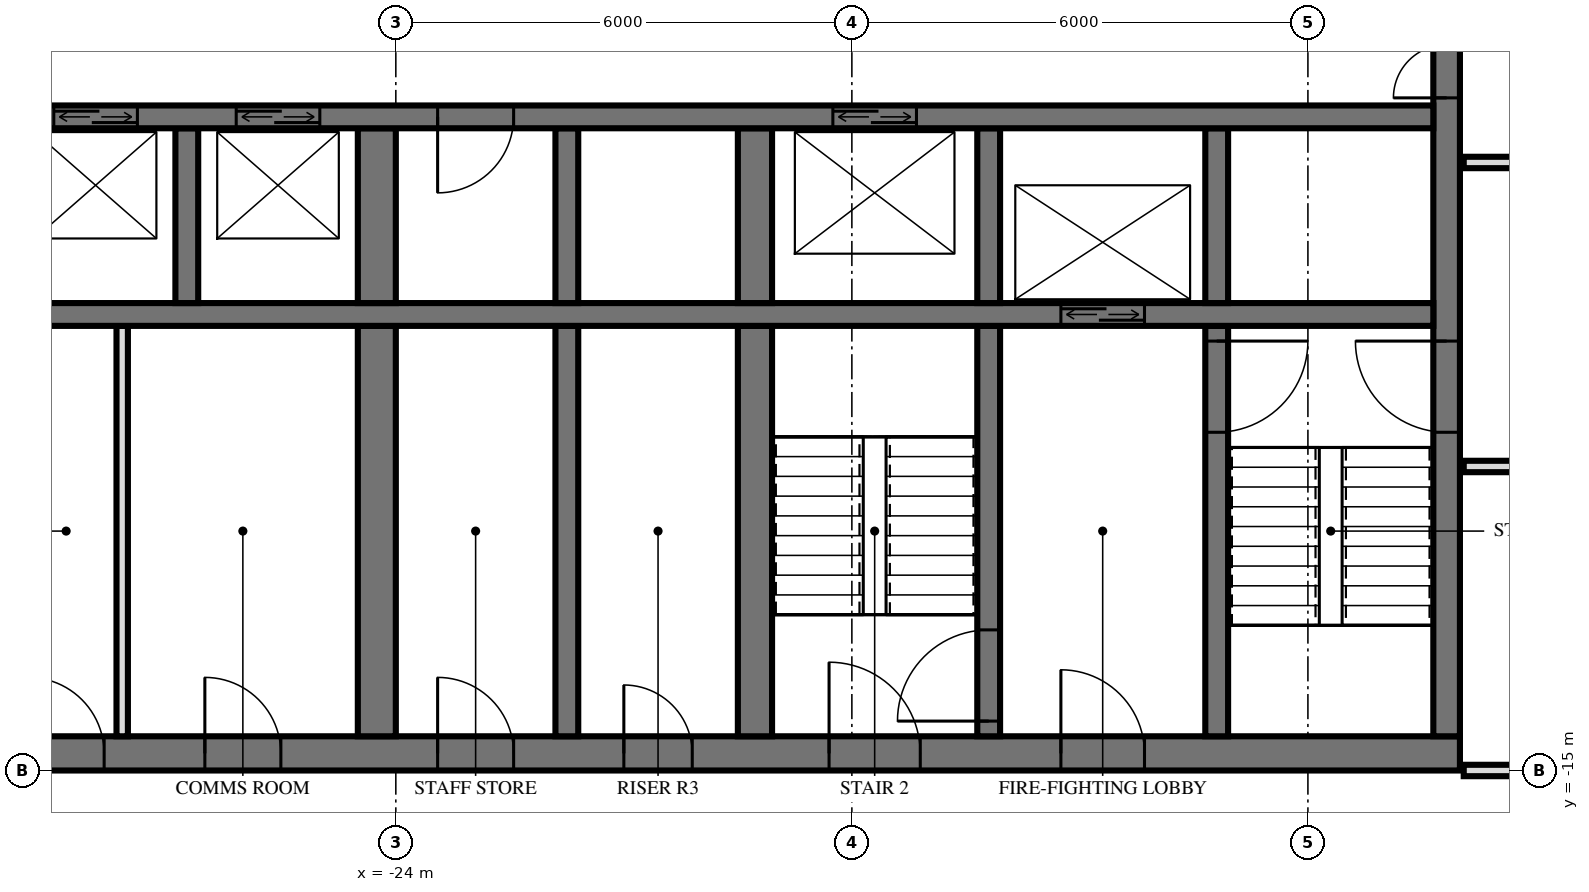
"""IFC4 building model, lengths in metres.
Left out: names, types, materials, properties, quantities, classifications, styles, units other than length and angle.
Written with IfcOpenShell. Run it as: python <this file> out.ifc"""

import sys

from ifc_helpers import new_model, si_unit, direction, frame, frame_2d, origin, place, context, subcontext, project, spatial, rectangle, extrude, element, fill, save


model = new_model("IFC4")
c1 = context("Model", 3, precision=1e-05, world=origin(), true_north=direction((0.0, 1.0)))
c2 = subcontext(c1, "Body", "Model", "MODEL_VIEW")
j1 = project(units=[si_unit("LENGTHUNIT", "METRE"), si_unit("PLANEANGLEUNIT", "RADIAN")], contexts=[c1])
p1 = place(None, origin())
s1 = spatial("IfcSite", under=j1, at=p1, CompositionType="ELEMENT")
p2 = place(p1, origin())
s2 = spatial("IfcBuilding", under=s1, at=p2, CompositionType="ELEMENT")
p3 = place(p2, frame((0.0, 0.0, 38.4)))
s3 = spatial("IfcBuildingStorey", under=s2, at=p3, CompositionType="ELEMENT", Elevation=38.4)
p4 = place(p3, frame((-29.5, -14.775, 0.0), z_axis=(0.0, 0.0, 1.0), x_axis=(1.0, 0.0, 0.0)))
e1 = element("IfcWall", 1, at=p4, inside=s3, PredefinedType="SHEAR", context=c2, shape_type="SweptSolid", body=[
    extrude(rectangle(XDim=19.5, YDim=0.45, at=frame_2d((9.75, 0.0))), origin(), (0.0, 0.0, 1.0), 3.6),
])
p5 = place(p4, frame((11.2, 0.0, 0.0)))
e2 = element("IfcOpeningElement", 2, at=p5, cuts=e1, PredefinedType="OPENING", context=c2, shape_type="SweptSolid", body=[
    extrude(rectangle(XDim=1.2, YDim=2.1, at=frame_2d((0.6, 1.05))), frame((0.0, 0.235, 0.0), z_axis=(0.0, -1.0, 0.0), x_axis=(1.0, 0.0, 0.0)), (0.0, 0.0, 1.0), 0.47),
])
p6 = place(p4, frame((14.25, 0.0, 0.0)))
e3 = element("IfcOpeningElement", 3, at=p6, cuts=e1, PredefinedType="OPENING", context=c2, shape_type="SweptSolid", body=[
    extrude(rectangle(XDim=1.1, YDim=2.1, at=frame_2d((0.55, 1.05))), frame((0.0, 0.235, 0.0), z_axis=(0.0, -1.0, 0.0), x_axis=(1.0, 0.0, 0.0)), (0.0, 0.0, 1.0), 0.47),
])
p7 = place(p4, frame((8.5, 0.0, 0.0)))
e4 = element("IfcOpeningElement", 4, at=p7, cuts=e1, PredefinedType="OPENING", context=c2, shape_type="SweptSolid", body=[
    extrude(rectangle(XDim=0.9, YDim=2.1, at=frame_2d((0.45, 1.05))), frame((0.0, 0.235, 0.0), z_axis=(0.0, -1.0, 0.0), x_axis=(1.0, 0.0, 0.0)), (0.0, 0.0, 1.0), 0.47),
])
p8 = place(p4, frame((6.05, 0.0, 0.0)))
e5 = element("IfcOpeningElement", 5, at=p8, cuts=e1, PredefinedType="OPENING", context=c2, shape_type="SweptSolid", body=[
    extrude(rectangle(XDim=1.0, YDim=2.1, at=frame_2d((0.5, 1.05))), frame((0.0, 0.235, 0.0), z_axis=(0.0, -1.0, 0.0), x_axis=(1.0, 0.0, 0.0)), (0.0, 0.0, 1.0), 0.47),
])
p9 = place(p4, frame((2.988, 0.0, 0.0)))
e6 = element("IfcOpeningElement", 6, at=p9, cuts=e1, PredefinedType="OPENING", context=c2, shape_type="SweptSolid", body=[
    extrude(rectangle(XDim=1.0, YDim=2.1, at=frame_2d((0.5, 1.05))), frame((0.0, 0.235, 0.0), z_axis=(0.0, -1.0, 0.0), x_axis=(1.0, 0.0, 0.0)), (0.0, 0.0, 1.0), 0.47),
])
p10 = place(p4, frame((0.663, 0.0, 0.0)))
e7 = element("IfcOpeningElement", 7, at=p10, cuts=e1, PredefinedType="OPENING", context=c2, shape_type="SweptSolid", body=[
    extrude(rectangle(XDim=1.0, YDim=2.1, at=frame_2d((0.5, 1.05))), frame((0.0, 0.235, 0.0), z_axis=(0.0, -1.0, 0.0), x_axis=(1.0, 0.0, 0.0)), (0.0, 0.0, 1.0), 0.47),
])
p11 = place(p3, frame((-10.175, -14.55, 0.0), z_axis=(0.0, 0.0, 1.0), x_axis=(0.0, 1.0, 0.0)))
e8 = element("IfcWall", 8, at=p11, inside=s3, PredefinedType="SHEAR", context=c2, shape_type="SweptSolid", body=[
    extrude(rectangle(XDim=14.1, YDim=0.35, at=frame_2d((7.05, 0.0))), origin(), (0.0, 0.0, 1.0), 3.6),
])
p12 = place(p11, frame((8.4, 0.0, 0.0)))
e9 = element("IfcOpeningElement", 9, at=p12, cuts=e8, PredefinedType="OPENING", context=c2, shape_type="SweptSolid", body=[
    extrude(rectangle(XDim=1.4, YDim=2.4, at=frame_2d((0.7, 1.2))), frame((0.0, 0.185, 0.0), z_axis=(0.0, -1.0, 0.0), x_axis=(1.0, 0.0, 0.0)), (0.0, 0.0, 1.0), 0.37),
])
p13 = place(p11, frame((10.0, 0.0, 0.0)))
e10 = element("IfcOpeningElement", 10, at=p13, cuts=e8, PredefinedType="OPENING", context=c2, shape_type="SweptSolid", body=[
    extrude(rectangle(XDim=1.4, YDim=2.4, at=frame_2d((0.7, 1.2))), frame((0.0, 0.185, 0.0), z_axis=(0.0, -1.0, 0.0), x_axis=(1.0, 0.0, 0.0)), (0.0, 0.0, 1.0), 0.37),
])
p14 = place(p11, frame((4.0, 0.0, 0.0)))
e11 = element("IfcOpeningElement", 11, at=p14, cuts=e8, PredefinedType="OPENING", context=c2, shape_type="SweptSolid", body=[
    extrude(rectangle(XDim=1.2, YDim=2.1, at=frame_2d((0.6, 1.05))), frame((0.0, 0.185, 0.0), z_axis=(0.0, -1.0, 0.0), x_axis=(1.0, 0.0, 0.0)), (0.0, 0.0, 1.0), 0.37),
])
p15 = place(p3, frame((-29.05, -6.4, 0.0), z_axis=(0.0, 0.0, 1.0), x_axis=(1.0, 0.0, 0.0)))
e12 = element("IfcWall", 12, at=p15, inside=s3, PredefinedType="SHEAR", context=c2, shape_type="SweptSolid", body=[
    extrude(rectangle(XDim=18.7, YDim=0.3, at=frame_2d((9.35, 0.0))), origin(), (0.0, 0.0, 1.0), 3.6),
])
p16 = place(p15, frame((2.95, 0.0, 0.0)))
e13 = element("IfcOpeningElement", 13, at=p16, cuts=e12, PredefinedType="OPENING", context=c2, shape_type="SweptSolid", body=[
    extrude(rectangle(XDim=1.1, YDim=2.1, at=frame_2d((0.55, 1.05))), frame((0.0, 0.16, 0.0), z_axis=(0.0, -1.0, 0.0), x_axis=(1.0, 0.0, 0.0)), (0.0, 0.0, 1.0), 0.32),
])
p17 = place(p15, frame((0.55, 0.0, 0.0)))
e14 = element("IfcOpeningElement", 14, at=p17, cuts=e12, PredefinedType="OPENING", context=c2, shape_type="SweptSolid", body=[
    extrude(rectangle(XDim=1.1, YDim=2.1, at=frame_2d((0.55, 1.05))), frame((0.0, 0.16, 0.0), z_axis=(0.0, -1.0, 0.0), x_axis=(1.0, 0.0, 0.0)), (0.0, 0.0, 1.0), 0.32),
])
p18 = place(p15, frame((10.8, 0.0, 0.0)))
e15 = element("IfcOpeningElement", 15, at=p18, cuts=e12, PredefinedType="OPENING", context=c2, shape_type="SweptSolid", body=[
    extrude(rectangle(XDim=1.1, YDim=2.1, at=frame_2d((0.55, 1.05))), frame((0.0, 0.16, 0.0), z_axis=(0.0, -1.0, 0.0), x_axis=(1.0, 0.0, 0.0)), (0.0, 0.0, 1.0), 0.32),
])
p19 = place(p15, frame((5.6, 0.0, 0.0)))
e16 = element("IfcOpeningElement", 16, at=p19, cuts=e12, PredefinedType="OPENING", context=c2, shape_type="SweptSolid", body=[
    extrude(rectangle(XDim=1.0, YDim=2.1, at=frame_2d((0.5, 1.05))), frame((0.0, 0.16, 0.0), z_axis=(0.0, -1.0, 0.0), x_axis=(1.0, 0.0, 0.0)), (0.0, 0.0, 1.0), 0.32),
])
p20 = place(p3, frame((-29.05, -9.0, 0.0), z_axis=(0.0, 0.0, 1.0), x_axis=(1.0, 0.0, 0.0)))
e17 = element("IfcWall", 17, at=p20, inside=s3, PredefinedType="SHEAR", context=c2, shape_type="SweptSolid", body=[
    extrude(rectangle(XDim=18.7, YDim=0.3, at=frame_2d((9.35, 0.0))), origin(), (0.0, 0.0, 1.0), 3.6),
])
p21 = place(p20, frame((13.8, 0.0, 0.0)))
e18 = element("IfcOpeningElement", 18, at=p21, cuts=e17, PredefinedType="OPENING", context=c2, shape_type="SweptSolid", body=[
    extrude(rectangle(XDim=1.1, YDim=2.1, at=frame_2d((0.55, 1.05))), frame((0.0, 0.16, 0.0), z_axis=(0.0, -1.0, 0.0), x_axis=(1.0, 0.0, 0.0)), (0.0, 0.0, 1.0), 0.32),
])
p22 = place(p3, frame((-13.2, -8.85, 0.0), z_axis=(0.0, 0.0, 1.0), x_axis=(0.0, 1.0, 0.0)))
e19 = element("IfcWall", 19, at=p22, inside=s3, PredefinedType="SHEAR", context=c2, shape_type="SweptSolid", body=[
    extrude(rectangle(XDim=2.3, YDim=0.3, at=frame_2d((1.15, 0.0))), origin(), (0.0, 0.0, 1.0), 3.6),
])
p23 = place(p3, frame((-13.2, -14.55, 0.0), z_axis=(0.0, 0.0, 1.0), x_axis=(0.0, 1.0, 0.0)))
e20 = element("IfcWall", 20, at=p23, inside=s3, PredefinedType="SHEAR", context=c2, shape_type="SweptSolid", body=[
    extrude(rectangle(XDim=5.4, YDim=0.3, at=frame_2d((2.7, 0.0))), origin(), (0.0, 0.0, 1.0), 3.6),
])
p24 = place(p23, frame((4.0, 0.0, 0.0)))
e21 = element("IfcOpeningElement", 21, at=p24, cuts=e20, PredefinedType="OPENING", context=c2, shape_type="SweptSolid", body=[
    extrude(rectangle(XDim=1.2, YDim=2.1, at=frame_2d((0.6, 1.05))), frame((0.0, 0.16, 0.0), z_axis=(0.0, -1.0, 0.0), x_axis=(1.0, 0.0, 0.0)), (0.0, 0.0, 1.0), 0.32),
])
p25 = place(p3, frame((-16.2, -8.85, 0.0), z_axis=(0.0, 0.0, 1.0), x_axis=(0.0, 1.0, 0.0)))
e22 = element("IfcWall", 22, at=p25, inside=s3, PredefinedType="SHEAR", context=c2, shape_type="SweptSolid", body=[
    extrude(rectangle(XDim=2.3, YDim=0.3, at=frame_2d((1.15, 0.0))), origin(), (0.0, 0.0, 1.0), 3.6),
])
p26 = place(p3, frame((-16.2, -14.55, 0.0), z_axis=(0.0, 0.0, 1.0), x_axis=(0.0, 1.0, 0.0)))
e23 = element("IfcWall", 23, at=p26, inside=s3, PredefinedType="SHEAR", context=c2, shape_type="SweptSolid", body=[
    extrude(rectangle(XDim=5.4, YDim=0.3, at=frame_2d((2.7, 0.0))), origin(), (0.0, 0.0, 1.0), 3.6),
])
p27 = place(p26, frame((0.2, 0.0, 0.0)))
e24 = element("IfcOpeningElement", 24, at=p27, cuts=e23, PredefinedType="OPENING", context=c2, shape_type="SweptSolid", body=[
    extrude(rectangle(XDim=1.2, YDim=2.1, at=frame_2d((0.6, 1.05))), frame((0.0, 0.16, 0.0), z_axis=(0.0, -1.0, 0.0), x_axis=(1.0, 0.0, 0.0)), (0.0, 0.0, 1.0), 0.32),
])
p28 = place(p3, frame((-19.275, -8.85, 0.0), z_axis=(0.0, 0.0, 1.0), x_axis=(0.0, 1.0, 0.0)))
e25 = element("IfcWall", 25, at=p28, inside=s3, PredefinedType="SHEAR", context=c2, shape_type="SweptSolid", body=[
    extrude(rectangle(XDim=2.3, YDim=0.45, at=frame_2d((1.15, 0.0))), origin(), (0.0, 0.0, 1.0), 3.6),
])
p29 = place(p3, frame((-19.275, -14.55, 0.0), z_axis=(0.0, 0.0, 1.0), x_axis=(0.0, 1.0, 0.0)))
e26 = element("IfcWall", 26, at=p29, inside=s3, PredefinedType="SHEAR", context=c2, shape_type="SweptSolid", body=[
    extrude(rectangle(XDim=5.4, YDim=0.45, at=frame_2d((2.7, 0.0))), origin(), (0.0, 0.0, 1.0), 3.6),
])
p30 = place(p3, frame((-21.75, -8.85, 0.0), z_axis=(0.0, 0.0, 1.0), x_axis=(0.0, 1.0, 0.0)))
e27 = element("IfcWall", 27, at=p30, inside=s3, PredefinedType="SHEAR", context=c2, shape_type="SweptSolid", body=[
    extrude(rectangle(XDim=2.3, YDim=0.3, at=frame_2d((1.15, 0.0))), origin(), (0.0, 0.0, 1.0), 3.6),
])
p31 = place(p3, frame((-21.75, -14.55, 0.0), z_axis=(0.0, 0.0, 1.0), x_axis=(0.0, 1.0, 0.0)))
e28 = element("IfcWall", 28, at=p31, inside=s3, PredefinedType="SHEAR", context=c2, shape_type="SweptSolid", body=[
    extrude(rectangle(XDim=5.4, YDim=0.3, at=frame_2d((2.7, 0.0))), origin(), (0.0, 0.0, 1.0), 3.6),
])
p32 = place(p3, frame((-24.25, -8.85, 0.0), z_axis=(0.0, 0.0, 1.0), x_axis=(0.0, 1.0, 0.0)))
e29 = element("IfcWall", 29, at=p32, inside=s3, PredefinedType="SHEAR", context=c2, shape_type="SweptSolid", body=[
    extrude(rectangle(XDim=2.3, YDim=0.5, at=frame_2d((1.15, 0.0))), origin(), (0.0, 0.0, 1.0), 3.6),
])
p33 = place(p3, frame((-24.25, -14.55, 0.0), z_axis=(0.0, 0.0, 1.0), x_axis=(0.0, 1.0, 0.0)))
e30 = element("IfcWall", 30, at=p33, inside=s3, PredefinedType="SHEAR", context=c2, shape_type="SweptSolid", body=[
    extrude(rectangle(XDim=5.4, YDim=0.5, at=frame_2d((2.7, 0.0))), origin(), (0.0, 0.0, 1.0), 3.6),
])
p34 = place(p3, frame((-26.75, -8.85, 0.0), z_axis=(0.0, 0.0, 1.0), x_axis=(0.0, 1.0, 0.0)))
e31 = element("IfcWall", 31, at=p34, inside=s3, PredefinedType="SHEAR", context=c2, shape_type="SweptSolid", body=[
    extrude(rectangle(XDim=2.3, YDim=0.3, at=frame_2d((1.15, 0.0))), origin(), (0.0, 0.0, 1.0), 3.6),
])
p35 = place(p3, frame((-27.6, -14.55, 0.0), z_axis=(0.0, 0.0, 1.0), x_axis=(0.0, 1.0, 0.0)))
e32 = element("IfcWall", 32, at=p35, inside=s3, PredefinedType="PARTITIONING", context=c2, shape_type="SweptSolid", body=[
    extrude(rectangle(XDim=5.4, YDim=0.15, at=frame_2d((2.7, 0.0))), origin(), (0.0, 0.0, 1.0), 3.3),
])
p36 = place(p3, frame((-9.95, -15.0, 0.0), z_axis=(0.0, 0.0, 1.0), x_axis=(1.0, 0.0, 0.0)))
e33 = element("IfcWall", 33, at=p36, inside=s3, PredefinedType="PARTITIONING", context=c2, shape_type="SweptSolid", body=[
    extrude(rectangle(XDim=19.9, YDim=0.15, at=frame_2d((9.95, 0.0))), origin(), (0.0, 0.0, 1.0), 2.684),
])
p37 = place(p36, frame((9.45, 0.0, 0.0)))
e34 = element("IfcOpeningElement", 34, at=p37, cuts=e33, PredefinedType="OPENING", context=c2, shape_type="SweptSolid", body=[
    extrude(rectangle(XDim=1.0, YDim=2.1, at=frame_2d((0.5, 1.05))), frame((0.0, 0.085, 0.0), z_axis=(0.0, -1.0, 0.0), x_axis=(1.0, 0.0, 0.0)), (0.0, 0.0, 1.0), 0.17),
])
p38 = place(p3, frame((-9.95, -11.0, 0.0), z_axis=(0.0, 0.0, 1.0), x_axis=(1.0, 0.0, 0.0)))
e35 = element("IfcWall", 35, at=p38, inside=s3, PredefinedType="PARTITIONING", context=c2, shape_type="SweptSolid", body=[
    extrude(rectangle(XDim=19.9, YDim=0.15, at=frame_2d((9.95, 0.0))), origin(), (0.0, 0.0, 1.0), 3.32),
])
p39 = place(p38, frame((9.45, 0.0, 0.0)))
e36 = element("IfcOpeningElement", 36, at=p39, cuts=e35, PredefinedType="OPENING", context=c2, shape_type="SweptSolid", body=[
    extrude(rectangle(XDim=1.0, YDim=2.1, at=frame_2d((0.5, 1.05))), frame((0.0, 0.085, 0.0), z_axis=(0.0, -1.0, 0.0), x_axis=(1.0, 0.0, 0.0)), (0.0, 0.0, 1.0), 0.17),
])
p40 = place(p38, frame((3.45, 0.0, 0.0)))
e37 = element("IfcOpeningElement", 37, at=p40, cuts=e35, PredefinedType="OPENING", context=c2, shape_type="SweptSolid", body=[
    extrude(rectangle(XDim=1.0, YDim=2.1, at=frame_2d((0.5, 1.05))), frame((0.0, 0.085, 0.0), z_axis=(0.0, -1.0, 0.0), x_axis=(1.0, 0.0, 0.0)), (0.0, 0.0, 1.0), 0.17),
])
p41 = place(p3, frame((-9.95, -7.0, 0.0), z_axis=(0.0, 0.0, 1.0), x_axis=(1.0, 0.0, 0.0)))
e38 = element("IfcWall", 38, at=p41, inside=s3, PredefinedType="PARTITIONING", context=c2, shape_type="SweptSolid", body=[
    extrude(rectangle(XDim=19.9, YDim=0.15, at=frame_2d((9.95, 0.0))), origin(), (0.0, 0.0, 1.0), 3.32),
])
p42 = place(p41, frame((9.45, 0.0, 0.0)))
e39 = element("IfcOpeningElement", 39, at=p42, cuts=e38, PredefinedType="OPENING", context=c2, shape_type="SweptSolid", body=[
    extrude(rectangle(XDim=1.0, YDim=2.1, at=frame_2d((0.5, 1.05))), frame((0.0, 0.085, 0.0), z_axis=(0.0, -1.0, 0.0), x_axis=(1.0, 0.0, 0.0)), (0.0, 0.0, 1.0), 0.17),
])
p43 = place(p41, frame((15.45, 0.0, 0.0)))
e40 = element("IfcOpeningElement", 40, at=p43, cuts=e38, PredefinedType="OPENING", context=c2, shape_type="SweptSolid", body=[
    extrude(rectangle(XDim=1.0, YDim=2.1, at=frame_2d((0.5, 1.05))), frame((0.0, 0.085, 0.0), z_axis=(0.0, -1.0, 0.0), x_axis=(1.0, 0.0, 0.0)), (0.0, 0.0, 1.0), 0.17),
])
p44 = place(p16, origin())
e41 = element("IfcDoor", 41, at=p44, inside=s3, OperationType="DOUBLE_DOOR_SLIDING", PredefinedType="USERDEFINED", context=c2, shape_type="SweptSolid", body=[
    extrude(rectangle(XDim=1.1, YDim=2.1, at=frame_2d((0.55, 1.05))), frame((0.0, 0.025, 0.0), z_axis=(0.0, -1.0, 0.0), x_axis=(1.0, 0.0, 0.0)), (0.0, 0.0, 1.0), 0.05),
])
fill(e13, e41)
p45 = place(p17, origin())
e42 = element("IfcDoor", 42, at=p45, inside=s3, OperationType="DOUBLE_DOOR_SLIDING", PredefinedType="USERDEFINED", context=c2, shape_type="SweptSolid", body=[
    extrude(rectangle(XDim=1.1, YDim=2.1, at=frame_2d((0.55, 1.05))), frame((0.0, 0.025, 0.0), z_axis=(0.0, -1.0, 0.0), x_axis=(1.0, 0.0, 0.0)), (0.0, 0.0, 1.0), 0.05),
])
fill(e14, e42)
p46 = place(p21, origin())
e43 = element("IfcDoor", 43, at=p46, inside=s3, OperationType="DOUBLE_DOOR_SLIDING", PredefinedType="USERDEFINED", context=c2, shape_type="SweptSolid", body=[
    extrude(rectangle(XDim=1.1, YDim=2.1, at=frame_2d((0.55, 1.05))), frame((0.0, 0.025, 0.0), z_axis=(0.0, -1.0, 0.0), x_axis=(1.0, 0.0, 0.0)), (0.0, 0.0, 1.0), 0.05),
])
fill(e18, e43)
p47 = place(p18, origin())
e44 = element("IfcDoor", 44, at=p47, inside=s3, OperationType="DOUBLE_DOOR_SLIDING", PredefinedType="USERDEFINED", context=c2, shape_type="SweptSolid", body=[
    extrude(rectangle(XDim=1.1, YDim=2.1, at=frame_2d((0.55, 1.05))), frame((0.0, 0.025, 0.0), z_axis=(0.0, -1.0, 0.0), x_axis=(1.0, 0.0, 0.0)), (0.0, 0.0, 1.0), 0.05),
])
fill(e15, e44)
p48 = place(p12, origin())
e45 = element("IfcDoor", 45, at=p48, inside=s3, OperationType="DOUBLE_DOOR_SINGLE_SWING", PredefinedType="DOOR", context=c2, shape_type="SweptSolid", body=[
    extrude(rectangle(XDim=1.4, YDim=2.4, at=frame_2d((0.7, 1.2))), frame((0.0, 0.025, 0.0), z_axis=(0.0, -1.0, 0.0), x_axis=(1.0, 0.0, 0.0)), (0.0, 0.0, 1.0), 0.05),
])
fill(e9, e45)
p49 = place(p14, origin())
e46 = element("IfcDoor", 46, at=p49, inside=s3, OperationType="SINGLE_SWING_LEFT", PredefinedType="DOOR", context=c2, shape_type="SweptSolid", body=[
    extrude(rectangle(XDim=1.2, YDim=2.1, at=frame_2d((0.6, 1.05))), frame((0.0, 0.025, 0.0), z_axis=(0.0, -1.0, 0.0), x_axis=(1.0, 0.0, 0.0)), (0.0, 0.0, 1.0), 0.05),
])
fill(e11, e46)
p50 = place(p5, origin())
e47 = element("IfcDoor", 47, at=p50, inside=s3, OperationType="SINGLE_SWING_RIGHT", PredefinedType="DOOR", context=c2, shape_type="SweptSolid", body=[
    extrude(rectangle(XDim=1.2, YDim=2.1, at=frame_2d((0.6, 1.05))), frame((0.0, 0.025, 0.0), z_axis=(0.0, -1.0, 0.0), x_axis=(1.0, 0.0, 0.0)), (0.0, 0.0, 1.0), 0.05),
])
fill(e2, e47)
p51 = place(p6, origin())
e48 = element("IfcDoor", 48, at=p51, inside=s3, OperationType="SINGLE_SWING_RIGHT", PredefinedType="DOOR", context=c2, shape_type="SweptSolid", body=[
    extrude(rectangle(XDim=1.1, YDim=2.1, at=frame_2d((0.55, 1.05))), frame((0.0, 0.025, 0.0), z_axis=(0.0, -1.0, 0.0), x_axis=(1.0, 0.0, 0.0)), (0.0, 0.0, 1.0), 0.05),
])
fill(e3, e48)
p52 = place(p7, origin())
e49 = element("IfcDoor", 49, at=p52, inside=s3, OperationType="SINGLE_SWING_RIGHT", PredefinedType="DOOR", context=c2, shape_type="SweptSolid", body=[
    extrude(rectangle(XDim=0.9, YDim=2.1, at=frame_2d((0.45, 1.05))), frame((0.0, 0.025, 0.0), z_axis=(0.0, -1.0, 0.0), x_axis=(1.0, 0.0, 0.0)), (0.0, 0.0, 1.0), 0.05),
])
fill(e4, e49)
p53 = place(p8, origin())
e50 = element("IfcDoor", 50, at=p53, inside=s3, OperationType="SINGLE_SWING_RIGHT", PredefinedType="DOOR", context=c2, shape_type="SweptSolid", body=[
    extrude(rectangle(XDim=1.0, YDim=2.1, at=frame_2d((0.5, 1.05))), frame((0.0, 0.025, 0.0), z_axis=(0.0, -1.0, 0.0), x_axis=(1.0, 0.0, 0.0)), (0.0, 0.0, 1.0), 0.05),
])
fill(e5, e50)
p54 = place(p9, origin())
e51 = element("IfcDoor", 51, at=p54, inside=s3, OperationType="SINGLE_SWING_RIGHT", PredefinedType="DOOR", context=c2, shape_type="SweptSolid", body=[
    extrude(rectangle(XDim=1.0, YDim=2.1, at=frame_2d((0.5, 1.05))), frame((0.0, 0.025, 0.0), z_axis=(0.0, -1.0, 0.0), x_axis=(1.0, 0.0, 0.0)), (0.0, 0.0, 1.0), 0.05),
])
fill(e6, e51)
p55 = place(p10, origin())
e52 = element("IfcDoor", 52, at=p55, inside=s3, OperationType="SINGLE_SWING_RIGHT", PredefinedType="DOOR", context=c2, shape_type="SweptSolid", body=[
    extrude(rectangle(XDim=1.0, YDim=2.1, at=frame_2d((0.5, 1.05))), frame((0.0, 0.025, 0.0), z_axis=(0.0, -1.0, 0.0), x_axis=(1.0, 0.0, 0.0)), (0.0, 0.0, 1.0), 0.05),
])
fill(e7, e52)
p56 = place(p19, frame((0.5, 0.0, 0.0), z_axis=(0.0, 0.0, 1.0), x_axis=(-1.0, 0.0, 0.0)))
e53 = element("IfcDoor", 53, at=p56, inside=s3, OperationType="SINGLE_SWING_LEFT", PredefinedType="DOOR", context=c2, shape_type="SweptSolid", body=[
    extrude(rectangle(XDim=1.0, YDim=2.1, at=frame_2d((0.0, 1.05))), frame((0.0, -0.025, 0.0), z_axis=(0.0, 1.0, 0.0), x_axis=(-1.0, 0.0, 0.0)), (0.0, 0.0, 1.0), 0.05),
])
fill(e16, e53)
p57 = place(p24, frame((0.6, 0.0, 0.0), z_axis=(0.0, 0.0, 1.0), x_axis=(-1.0, 0.0, 0.0)))
e54 = element("IfcDoor", 54, at=p57, inside=s3, OperationType="SINGLE_SWING_RIGHT", PredefinedType="DOOR", context=c2, shape_type="SweptSolid", body=[
    extrude(rectangle(XDim=1.2, YDim=2.1, at=frame_2d((0.0, 1.05))), frame((0.0, -0.025, 0.0), z_axis=(0.0, 1.0, 0.0), x_axis=(-1.0, 0.0, 0.0)), (0.0, 0.0, 1.0), 0.05),
])
fill(e21, e54)
p58 = place(p27, origin())
e55 = element("IfcDoor", 55, at=p58, inside=s3, OperationType="SINGLE_SWING_RIGHT", PredefinedType="DOOR", context=c2, shape_type="SweptSolid", body=[
    extrude(rectangle(XDim=1.2, YDim=2.1, at=frame_2d((0.6, 1.05))), frame((0.0, 0.025, 0.0), z_axis=(0.0, -1.0, 0.0), x_axis=(1.0, 0.0, 0.0)), (0.0, 0.0, 1.0), 0.05),
])
fill(e24, e55)
save(model, sys.argv[1])
